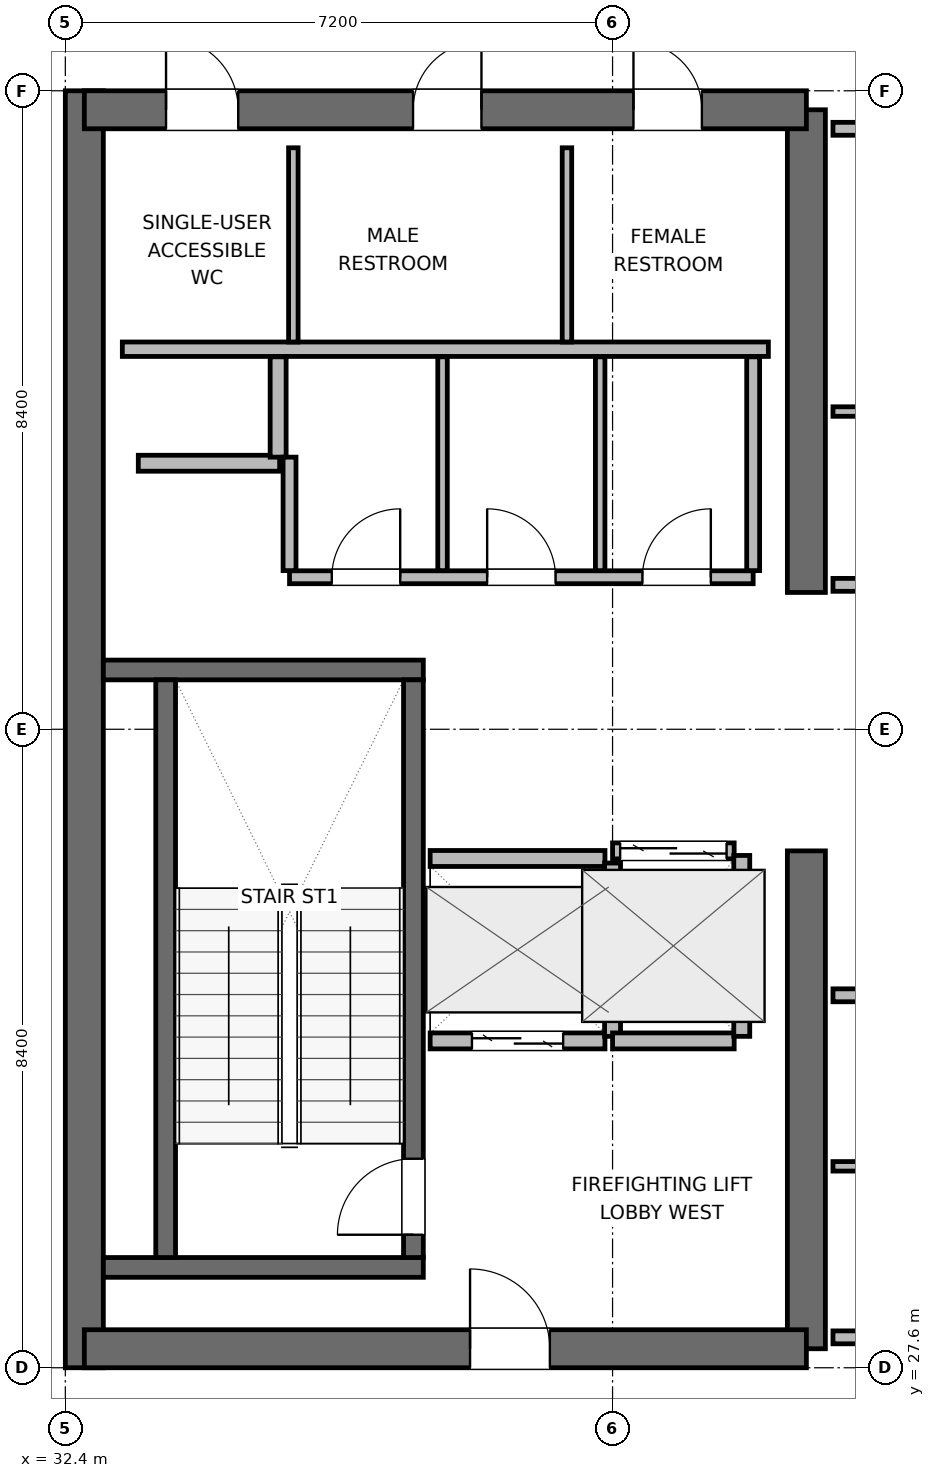
"""IFC4 building model, lengths in metres.
Left out: names, types, materials, properties, quantities, classifications, styles, units other than length and angle.
Written with IfcOpenShell. Run it as: python <this file> out.ifc"""

import sys

from ifc_helpers import new_model, si_unit, direction, frame, frame_2d, origin, place, context, subcontext, project, spatial, rectangle, extrude, element, fill, save


model = new_model("IFC4")
c1 = context("Model", 3, precision=1e-05, world=origin(), true_north=direction((0.0, 1.0)))
c2 = subcontext(c1, "Body", "Model", "MODEL_VIEW")
j1 = project(units=[si_unit("LENGTHUNIT", "METRE"), si_unit("PLANEANGLEUNIT", "RADIAN")], contexts=[c1])
p1 = place(None, origin())
s1 = spatial("IfcSite", under=j1, at=p1, CompositionType="ELEMENT")
p2 = place(p1, origin())
s2 = spatial("IfcBuilding", under=s1, at=p2, CompositionType="ELEMENT")
p3 = place(p2, frame((0.0, 0.0, 342.0)))
s3 = spatial("IfcBuildingStorey", under=s2, at=p3, CompositionType="ELEMENT", Elevation=342.0)
p4 = place(p3, frame((32.65, 27.6, 0.0), z_axis=(0.0, 0.0, 1.0), x_axis=(0.0, 1.0, 0.0)))
e1 = element("IfcWall", 1, at=p4, inside=s3, PredefinedType="SHEAR", context=c2, shape_type="SweptSolid", body=[
    extrude(rectangle(XDim=16.8, YDim=0.5, at=frame_2d((8.4, 0.0))), origin(), (0.0, 0.0, 1.0), 4.5),
])
p5 = place(p3, frame((42.15, 27.85, 0.0), z_axis=(0.0, 0.0, 1.0), x_axis=(0.0, 1.0, 0.0)))
e2 = element("IfcWall", 2, at=p5, inside=s3, PredefinedType="SHEAR", context=c2, shape_type="SweptSolid", body=[
    extrude(rectangle(XDim=6.55, YDim=0.5, at=frame_2d((3.275, 0.0))), origin(), (0.0, 0.0, 1.0), 4.5),
])
p6 = place(p3, frame((42.15, 37.8, 0.0), z_axis=(0.0, 0.0, 1.0), x_axis=(0.0, 1.0, 0.0)))
e3 = element("IfcWall", 3, at=p6, inside=s3, PredefinedType="SHEAR", context=c2, shape_type="SweptSolid", body=[
    extrude(rectangle(XDim=6.35, YDim=0.5, at=frame_2d((3.175, 0.0))), origin(), (0.0, 0.0, 1.0), 4.5),
])
p7 = place(p3, frame((32.65, 27.85, 0.0), z_axis=(0.0, 0.0, 1.0), x_axis=(1.0, 0.0, 0.0)))
e4 = element("IfcWall", 4, at=p7, inside=s3, PredefinedType="SHEAR", context=c2, shape_type="SweptSolid", body=[
    extrude(rectangle(XDim=9.5, YDim=0.5, at=frame_2d((4.75, 0.0))), origin(), (0.0, 0.0, 1.0), 4.5),
])
p8 = place(p7, frame((5.075, 0.0, 0.0)))
e5 = element("IfcOpeningElement", 5, at=p8, cuts=e4, PredefinedType="OPENING", context=c2, shape_type="SweptSolid", body=[
    extrude(rectangle(XDim=1.05, YDim=2.04, at=frame_2d((0.525, 1.02))), frame((0.0, 0.26, 0.0), z_axis=(0.0, -1.0, 0.0), x_axis=(1.0, 0.0, 0.0)), (0.0, 0.0, 1.0), 0.52),
])
p9 = place(p3, frame((32.65, 44.15, 0.0), z_axis=(0.0, 0.0, 1.0), x_axis=(1.0, 0.0, 0.0)))
e6 = element("IfcWall", 6, at=p9, inside=s3, PredefinedType="SHEAR", context=c2, shape_type="SweptSolid", body=[
    extrude(rectangle(XDim=9.5, YDim=0.5, at=frame_2d((4.75, 0.0))), origin(), (0.0, 0.0, 1.0), 4.5),
])
p10 = place(p9, frame((1.075, 0.0, 0.0)))
e7 = element("IfcOpeningElement", 7, at=p10, cuts=e6, PredefinedType="OPENING", context=c2, shape_type="SweptSolid", body=[
    extrude(rectangle(XDim=0.95, YDim=2.04, at=frame_2d((0.475, 1.02))), frame((0.0, 0.26, 0.0), z_axis=(0.0, -1.0, 0.0), x_axis=(1.0, 0.0, 0.0)), (0.0, 0.0, 1.0), 0.52),
])
p11 = place(p9, frame((4.325, 0.0, 0.0)))
e8 = element("IfcOpeningElement", 8, at=p11, cuts=e6, PredefinedType="OPENING", context=c2, shape_type="SweptSolid", body=[
    extrude(rectangle(XDim=0.9, YDim=2.02, at=frame_2d((0.45, 1.01))), frame((0.0, 0.26, 0.0), z_axis=(0.0, -1.0, 0.0), x_axis=(1.0, 0.0, 0.0)), (0.0, 0.0, 1.0), 0.52),
])
p12 = place(p9, frame((7.225, 0.0, 0.0)))
e9 = element("IfcOpeningElement", 9, at=p12, cuts=e6, PredefinedType="OPENING", context=c2, shape_type="SweptSolid", body=[
    extrude(rectangle(XDim=0.9, YDim=2.02, at=frame_2d((0.45, 1.01))), frame((0.0, 0.26, 0.0), z_axis=(0.0, -1.0, 0.0), x_axis=(1.0, 0.0, 0.0)), (0.0, 0.0, 1.0), 0.52),
])
for number, where, z_axis, x_axis in (
    (10, (32.9, 28.92, 0.0), (0.0, 0.0, 1.0), (1.0, 0.0, 0.0)),
    (11, (32.9, 36.78, 0.0), (0.0, 0.0, 1.0), (1.0, 0.0, 0.0)),
):
    element("IfcWall", number, at=place(p3, frame(where, z_axis=z_axis, x_axis=x_axis)), inside=s3, PredefinedType="SHEAR", context=c2, shape_type="SweptSolid", body=[
        extrude(rectangle(XDim=4.21, YDim=0.26, at=frame_2d((2.105, 0.0))), origin(), (0.0, 0.0, 1.0), 4.5),
    ])
p13 = place(p3, frame((33.72, 29.05, 0.0), z_axis=(0.0, 0.0, 1.0), x_axis=(0.0, 1.0, 0.0)))
e12 = element("IfcWall", 12, at=p13, inside=s3, PredefinedType="SHEAR", context=c2, shape_type="SweptSolid", body=[
    extrude(rectangle(XDim=7.6, YDim=0.26, at=frame_2d((3.8, 0.0))), origin(), (0.0, 0.0, 1.0), 4.5),
])
p14 = place(p3, frame((36.98, 29.05, 0.0), z_axis=(0.0, 0.0, 1.0), x_axis=(0.0, 1.0, 0.0)))
e13 = element("IfcWall", 13, at=p14, inside=s3, PredefinedType="SHEAR", context=c2, shape_type="SweptSolid", body=[
    extrude(rectangle(XDim=7.6, YDim=0.26, at=frame_2d((3.8, 0.0))), origin(), (0.0, 0.0, 1.0), 4.5),
])
p15 = place(p14, frame((0.3, 0.0, 0.0)))
e14 = element("IfcOpeningElement", 14, at=p15, cuts=e13, PredefinedType="OPENING", context=c2, shape_type="SweptSolid", body=[
    extrude(rectangle(XDim=1.0, YDim=2.04, at=frame_2d((0.5, 1.02))), frame((0.0, 0.14, 0.0), z_axis=(0.0, -1.0, 0.0), x_axis=(1.0, 0.0, 0.0)), (0.0, 0.0, 1.0), 0.28),
])
p16 = place(p3, frame((33.15, 41.0, 0.0), z_axis=(0.0, 0.0, 1.0), x_axis=(1.0, 0.0, 0.0)))
e15 = element("IfcWall", 15, at=p16, inside=s3, PredefinedType="PLUMBINGWALL", context=c2, shape_type="SweptSolid", body=[
    extrude(rectangle(XDim=8.5, YDim=0.19, at=frame_2d((4.25, 0.0))), origin(), (0.0, 0.0, 1.0), 4.28),
])
for number, where, z_axis, x_axis in (
    (16, (35.4, 41.095, 0.0), (0.0, 0.0, 1.0), (0.0, 1.0, 0.0)),
    (17, (39.0, 41.095, 0.0), (0.0, 0.0, 1.0), (0.0, 1.0, 0.0)),
):
    element("IfcWall", number, at=place(p3, frame(where, z_axis=z_axis, x_axis=x_axis)), inside=s3, PredefinedType="PARTITIONING", context=c2, shape_type="SweptSolid", body=[
        extrude(rectangle(XDim=2.555, YDim=0.125, at=frame_2d((1.277, 0.0))), origin(), (0.0, 0.0, 1.0), 4.28),
    ])
p17 = place(p3, frame((33.36, 39.5, 0.0), z_axis=(0.0, 0.0, 1.0), x_axis=(1.0, 0.0, 0.0)))
e18 = element("IfcWall", 18, at=p17, inside=s3, PredefinedType="PARTITIONING", context=c2, shape_type="SweptSolid", body=[
    extrude(rectangle(XDim=1.86, YDim=0.21, at=frame_2d((0.93, 0.0))), origin(), (0.0, 0.0, 1.0), 4.28),
])
p18 = place(p3, frame((35.2, 39.58, 0.0), z_axis=(0.0, 0.0, 1.0), x_axis=(0.0, 1.0, 0.0)))
e19 = element("IfcWall", 19, at=p18, inside=s3, PredefinedType="PARTITIONING", context=c2, shape_type="SweptSolid", body=[
    extrude(rectangle(XDim=1.32, YDim=0.21, at=frame_2d((0.66, 0.0))), origin(), (0.0, 0.0, 1.0), 4.28),
])
p19 = place(p3, frame((37.2, 31.9, 0.0), z_axis=(0.0, 0.0, 1.0), x_axis=(1.0, 0.0, 0.0)))
e20 = element("IfcWall", 20, at=p19, inside=s3, PredefinedType="PARTITIONING", context=c2, shape_type="SweptSolid", body=[
    extrude(rectangle(XDim=2.3, YDim=0.21, at=frame_2d((1.15, 0.0))), origin(), (0.0, 0.0, 1.0), 4.28),
])
p20 = place(p19, frame((0.55, 0.0, 0.0)))
e21 = element("IfcOpeningElement", 21, at=p20, cuts=e20, PredefinedType="OPENING", context=c2, shape_type="SweptSolid", body=[
    extrude(rectangle(XDim=1.2, YDim=2.04, at=frame_2d((0.6, 1.02))), frame((0.0, 0.115, 0.0), z_axis=(0.0, -1.0, 0.0), x_axis=(1.0, 0.0, 0.0)), (0.0, 0.0, 1.0), 0.23),
])
p21 = place(p3, frame((37.2, 34.3, 0.0), z_axis=(0.0, 0.0, 1.0), x_axis=(1.0, 0.0, 0.0)))
e22 = element("IfcWall", 22, at=p21, inside=s3, PredefinedType="PARTITIONING", context=c2, shape_type="SweptSolid", body=[
    extrude(rectangle(XDim=2.3, YDim=0.21, at=frame_2d((1.15, 0.0))), origin(), (0.0, 0.0, 1.0), 4.28),
])
p22 = place(p3, frame((39.6, 31.96, 0.0), z_axis=(0.0, 0.0, 1.0), x_axis=(0.0, 1.0, 0.0)))
e23 = element("IfcWall", 23, at=p22, inside=s3, PredefinedType="PARTITIONING", context=c2, shape_type="SweptSolid", body=[
    extrude(rectangle(XDim=2.28, YDim=0.21, at=frame_2d((1.14, 0.0))), origin(), (0.0, 0.0, 1.0), 4.28),
])
p23 = place(p3, frame((39.6, 34.4, 0.0), z_axis=(0.0, 0.0, 1.0), x_axis=(1.0, 0.0, 0.0)))
e24 = element("IfcWall", 24, at=p23, inside=s3, PredefinedType="PARTITIONING", context=c2, shape_type="SweptSolid", body=[
    extrude(rectangle(XDim=1.6, YDim=0.21, at=frame_2d((0.8, 0.0))), origin(), (0.0, 0.0, 1.0), 4.28),
])
p24 = place(p23, frame((0.1, 0.0, 0.0)))
e25 = element("IfcOpeningElement", 25, at=p24, cuts=e24, PredefinedType="OPENING", context=c2, shape_type="SweptSolid", body=[
    extrude(rectangle(XDim=1.4, YDim=2.06, at=frame_2d((0.7, 1.03))), frame((0.0, 0.115, 0.0), z_axis=(0.0, -1.0, 0.0), x_axis=(1.0, 0.0, 0.0)), (0.0, 0.0, 1.0), 0.23),
])
p25 = place(p3, frame((39.6, 31.9, 0.0), z_axis=(0.0, 0.0, 1.0), x_axis=(1.0, 0.0, 0.0)))
e26 = element("IfcWall", 26, at=p25, inside=s3, PredefinedType="PARTITIONING", context=c2, shape_type="SweptSolid", body=[
    extrude(rectangle(XDim=1.6, YDim=0.21, at=frame_2d((0.8, 0.0))), origin(), (0.0, 0.0, 1.0), 4.28),
])
p26 = place(p3, frame((41.3, 31.96, 0.0), z_axis=(0.0, 0.0, 1.0), x_axis=(0.0, 1.0, 0.0)))
e27 = element("IfcWall", 27, at=p26, inside=s3, PredefinedType="PARTITIONING", context=c2, shape_type="SweptSolid", body=[
    extrude(rectangle(XDim=2.38, YDim=0.21, at=frame_2d((1.19, 0.0))), origin(), (0.0, 0.0, 1.0), 4.28),
])
p27 = place(p3, frame((35.35, 38.0, 0.0), z_axis=(0.0, 0.0, 1.0), x_axis=(1.0, 0.0, 0.0)))
e28 = element("IfcWall", 28, at=p27, inside=s3, PredefinedType="PARTITIONING", context=c2, shape_type="SweptSolid", body=[
    extrude(rectangle(XDim=6.1, YDim=0.17, at=frame_2d((3.05, 0.0))), origin(), (0.0, 0.0, 1.0), 4.28),
])
p28 = place(p27, frame((0.556, 0.0, 0.0)))
e29 = element("IfcOpeningElement", 29, at=p28, cuts=e28, PredefinedType="OPENING", context=c2, shape_type="SweptSolid", body=[
    extrude(rectangle(XDim=0.9, YDim=2.02, at=frame_2d((0.45, 1.01))), frame((0.0, 0.095, 0.0), z_axis=(0.0, -1.0, 0.0), x_axis=(1.0, 0.0, 0.0)), (0.0, 0.0, 1.0), 0.19),
])
p29 = place(p27, frame((2.6, 0.0, 0.0)))
e30 = element("IfcOpeningElement", 30, at=p29, cuts=e28, PredefinedType="OPENING", context=c2, shape_type="SweptSolid", body=[
    extrude(rectangle(XDim=0.9, YDim=2.02, at=frame_2d((0.45, 1.01))), frame((0.0, 0.095, 0.0), z_axis=(0.0, -1.0, 0.0), x_axis=(1.0, 0.0, 0.0)), (0.0, 0.0, 1.0), 0.19),
])
p30 = place(p27, frame((4.643, 0.0, 0.0)))
e31 = element("IfcOpeningElement", 31, at=p30, cuts=e28, PredefinedType="OPENING", context=c2, shape_type="SweptSolid", body=[
    extrude(rectangle(XDim=0.9, YDim=2.02, at=frame_2d((0.45, 1.01))), frame((0.0, 0.095, 0.0), z_axis=(0.0, -1.0, 0.0), x_axis=(1.0, 0.0, 0.0)), (0.0, 0.0, 1.0), 0.19),
])
p31 = place(p3, frame((35.35, 38.087, 0.0), z_axis=(0.0, 0.0, 1.0), x_axis=(0.0, 1.0, 0.0)))
e32 = element("IfcWall", 32, at=p31, inside=s3, PredefinedType="PARTITIONING", context=c2, shape_type="SweptSolid", body=[
    extrude(rectangle(XDim=1.493, YDim=0.17, at=frame_2d((0.747, 0.0))), origin(), (0.0, 0.0, 1.0), 4.28),
])
p32 = place(p3, frame((41.45, 38.087, 0.0), z_axis=(0.0, 0.0, 1.0), x_axis=(0.0, 1.0, 0.0)))
e33 = element("IfcWall", 33, at=p32, inside=s3, PredefinedType="PARTITIONING", context=c2, shape_type="SweptSolid", body=[
    extrude(rectangle(XDim=2.813, YDim=0.17, at=frame_2d((1.406, 0.0))), origin(), (0.0, 0.0, 1.0), 4.28),
])
for number, where, z_axis, x_axis in (
    (34, (37.363, 38.087, 0.0), (0.0, 0.0, 1.0), (0.0, 1.0, 0.0)),
    (35, (39.437, 38.087, 0.0), (0.0, 0.0, 1.0), (0.0, 1.0, 0.0)),
):
    element("IfcWall", number, at=place(p3, frame(where, z_axis=z_axis, x_axis=x_axis)), inside=s3, PredefinedType="PARTITIONING", context=c2, shape_type="SweptSolid", body=[
        extrude(rectangle(XDim=2.813, YDim=0.125, at=frame_2d((1.406, 0.0))), origin(), (0.0, 0.0, 1.0), 4.28),
    ])
p33 = place(p3, frame((42.5, 28.0, 0.0), z_axis=(0.0, 0.0, 1.0), x_axis=(1.0, 0.0, 0.0)))
e36 = element("IfcWall", 36, at=p33, inside=s3, PredefinedType="PARTITIONING", context=c2, shape_type="SweptSolid", body=[
    extrude(rectangle(XDim=4.213, YDim=0.17, at=frame_2d((2.106, 0.0))), origin(), (0.0, 0.0, 1.0), 3.365),
])
p34 = place(p3, frame((42.5, 32.5, 0.0), z_axis=(0.0, 0.0, 1.0), x_axis=(1.0, 0.0, 0.0)))
e37 = element("IfcWall", 37, at=p34, inside=s3, PredefinedType="PARTITIONING", context=c2, shape_type="SweptSolid", body=[
    extrude(rectangle(XDim=1.3, YDim=0.17, at=frame_2d((0.65, 0.0))), origin(), (0.0, 0.0, 1.0), 4.28),
])
p35 = place(p3, frame((42.5, 30.25, 0.0), z_axis=(0.0, 0.0, 1.0), x_axis=(1.0, 0.0, 0.0)))
e38 = element("IfcWall", 38, at=p35, inside=s3, PredefinedType="PARTITIONING", context=c2, shape_type="SweptSolid", body=[
    extrude(rectangle(XDim=4.213, YDim=0.125, at=frame_2d((2.106, 0.0))), origin(), (0.0, 0.0, 1.0), 4.28),
])
p36 = place(p3, frame((42.5, 37.9, 0.0), z_axis=(0.0, 0.0, 1.0), x_axis=(1.0, 0.0, 0.0)))
e39 = element("IfcWall", 39, at=p36, inside=s3, PredefinedType="PARTITIONING", context=c2, shape_type="SweptSolid", body=[
    extrude(rectangle(XDim=4.213, YDim=0.17, at=frame_2d((2.106, 0.0))), origin(), (0.0, 0.0, 1.0), 4.28),
])
p37 = place(p3, frame((42.5, 43.9, 0.0), z_axis=(0.0, 0.0, 1.0), x_axis=(1.0, 0.0, 0.0)))
e40 = element("IfcWall", 40, at=p37, inside=s3, PredefinedType="PARTITIONING", context=c2, shape_type="SweptSolid", body=[
    extrude(rectangle(XDim=4.213, YDim=0.17, at=frame_2d((2.106, 0.0))), origin(), (0.0, 0.0, 1.0), 3.365),
])
p38 = place(p3, frame((42.5, 40.18, 0.0), z_axis=(0.0, 0.0, 1.0), x_axis=(1.0, 0.0, 0.0)))
e41 = element("IfcWall", 41, at=p38, inside=s3, PredefinedType="PARTITIONING", context=c2, shape_type="SweptSolid", body=[
    extrude(rectangle(XDim=4.213, YDim=0.125, at=frame_2d((2.106, 0.0))), origin(), (0.0, 0.0, 1.0), 4.28),
])
p39 = place(p15, origin())
e42 = element("IfcDoor", 42, at=p39, inside=s3, OperationType="SINGLE_SWING_LEFT", PredefinedType="DOOR", context=c2, shape_type="SweptSolid", body=[
    extrude(rectangle(XDim=1.0, YDim=2.04, at=frame_2d((0.5, 1.02))), frame((0.0, 0.025, 0.0), z_axis=(0.0, -1.0, 0.0), x_axis=(1.0, 0.0, 0.0)), (0.0, 0.0, 1.0), 0.05),
])
fill(e14, e42)
p40 = place(p20, origin())
e43 = element("IfcDoor", 43, at=p40, inside=s3, OperationType="DOUBLE_DOOR_SLIDING", PredefinedType="DOOR", context=c2, shape_type="SweptSolid", body=[
    extrude(rectangle(XDim=1.2, YDim=2.04, at=frame_2d((0.6, 1.02))), frame((0.0, 0.025, 0.0), z_axis=(0.0, -1.0, 0.0), x_axis=(1.0, 0.0, 0.0)), (0.0, 0.0, 1.0), 0.05),
])
fill(e21, e43)
p41 = place(p24, origin())
e44 = element("IfcDoor", 44, at=p41, inside=s3, OperationType="DOUBLE_DOOR_SLIDING", PredefinedType="DOOR", context=c2, shape_type="SweptSolid", body=[
    extrude(rectangle(XDim=1.4, YDim=2.06, at=frame_2d((0.7, 1.03))), frame((0.0, 0.025, 0.0), z_axis=(0.0, -1.0, 0.0), x_axis=(1.0, 0.0, 0.0)), (0.0, 0.0, 1.0), 0.05),
])
fill(e25, e44)
p42 = place(p8, origin())
e45 = element("IfcDoor", 45, at=p42, inside=s3, OperationType="SINGLE_SWING_LEFT", PredefinedType="DOOR", context=c2, shape_type="SweptSolid", body=[
    extrude(rectangle(XDim=1.05, YDim=2.04, at=frame_2d((0.525, 1.02))), frame((0.0, 0.025, 0.0), z_axis=(0.0, -1.0, 0.0), x_axis=(1.0, 0.0, 0.0)), (0.0, 0.0, 1.0), 0.05),
])
fill(e5, e45)
p43 = place(p10, origin())
e46 = element("IfcDoor", 46, at=p43, inside=s3, OperationType="SINGLE_SWING_LEFT", PredefinedType="DOOR", context=c2, shape_type="SweptSolid", body=[
    extrude(rectangle(XDim=0.95, YDim=2.04, at=frame_2d((0.475, 1.02))), frame((0.0, 0.025, 0.0), z_axis=(0.0, -1.0, 0.0), x_axis=(1.0, 0.0, 0.0)), (0.0, 0.0, 1.0), 0.05),
])
fill(e7, e46)
p44 = place(p11, origin())
e47 = element("IfcDoor", 47, at=p44, inside=s3, OperationType="SINGLE_SWING_RIGHT", PredefinedType="DOOR", context=c2, shape_type="SweptSolid", body=[
    extrude(rectangle(XDim=0.9, YDim=2.02, at=frame_2d((0.45, 1.01))), frame((0.0, 0.025, 0.0), z_axis=(0.0, -1.0, 0.0), x_axis=(1.0, 0.0, 0.0)), (0.0, 0.0, 1.0), 0.05),
])
fill(e8, e47)
p45 = place(p12, origin())
e48 = element("IfcDoor", 48, at=p45, inside=s3, OperationType="SINGLE_SWING_LEFT", PredefinedType="DOOR", context=c2, shape_type="SweptSolid", body=[
    extrude(rectangle(XDim=0.9, YDim=2.02, at=frame_2d((0.45, 1.01))), frame((0.0, 0.025, 0.0), z_axis=(0.0, -1.0, 0.0), x_axis=(1.0, 0.0, 0.0)), (0.0, 0.0, 1.0), 0.05),
])
fill(e9, e48)
p46 = place(p28, origin())
e49 = element("IfcDoor", 49, at=p46, inside=s3, OperationType="SINGLE_SWING_RIGHT", PredefinedType="DOOR", context=c2, shape_type="SweptSolid", body=[
    extrude(rectangle(XDim=0.9, YDim=2.02, at=frame_2d((0.45, 1.01))), frame((0.0, 0.025, 0.0), z_axis=(0.0, -1.0, 0.0), x_axis=(1.0, 0.0, 0.0)), (0.0, 0.0, 1.0), 0.05),
])
fill(e29, e49)
p47 = place(p29, origin())
e50 = element("IfcDoor", 50, at=p47, inside=s3, OperationType="SINGLE_SWING_LEFT", PredefinedType="DOOR", context=c2, shape_type="SweptSolid", body=[
    extrude(rectangle(XDim=0.9, YDim=2.02, at=frame_2d((0.45, 1.01))), frame((0.0, 0.025, 0.0), z_axis=(0.0, -1.0, 0.0), x_axis=(1.0, 0.0, 0.0)), (0.0, 0.0, 1.0), 0.05),
])
fill(e30, e50)
p48 = place(p30, origin())
e51 = element("IfcDoor", 51, at=p48, inside=s3, OperationType="SINGLE_SWING_RIGHT", PredefinedType="DOOR", context=c2, shape_type="SweptSolid", body=[
    extrude(rectangle(XDim=0.9, YDim=2.02, at=frame_2d((0.45, 1.01))), frame((0.0, 0.025, 0.0), z_axis=(0.0, -1.0, 0.0), x_axis=(1.0, 0.0, 0.0)), (0.0, 0.0, 1.0), 0.05),
])
fill(e31, e51)
save(model, sys.argv[1])
